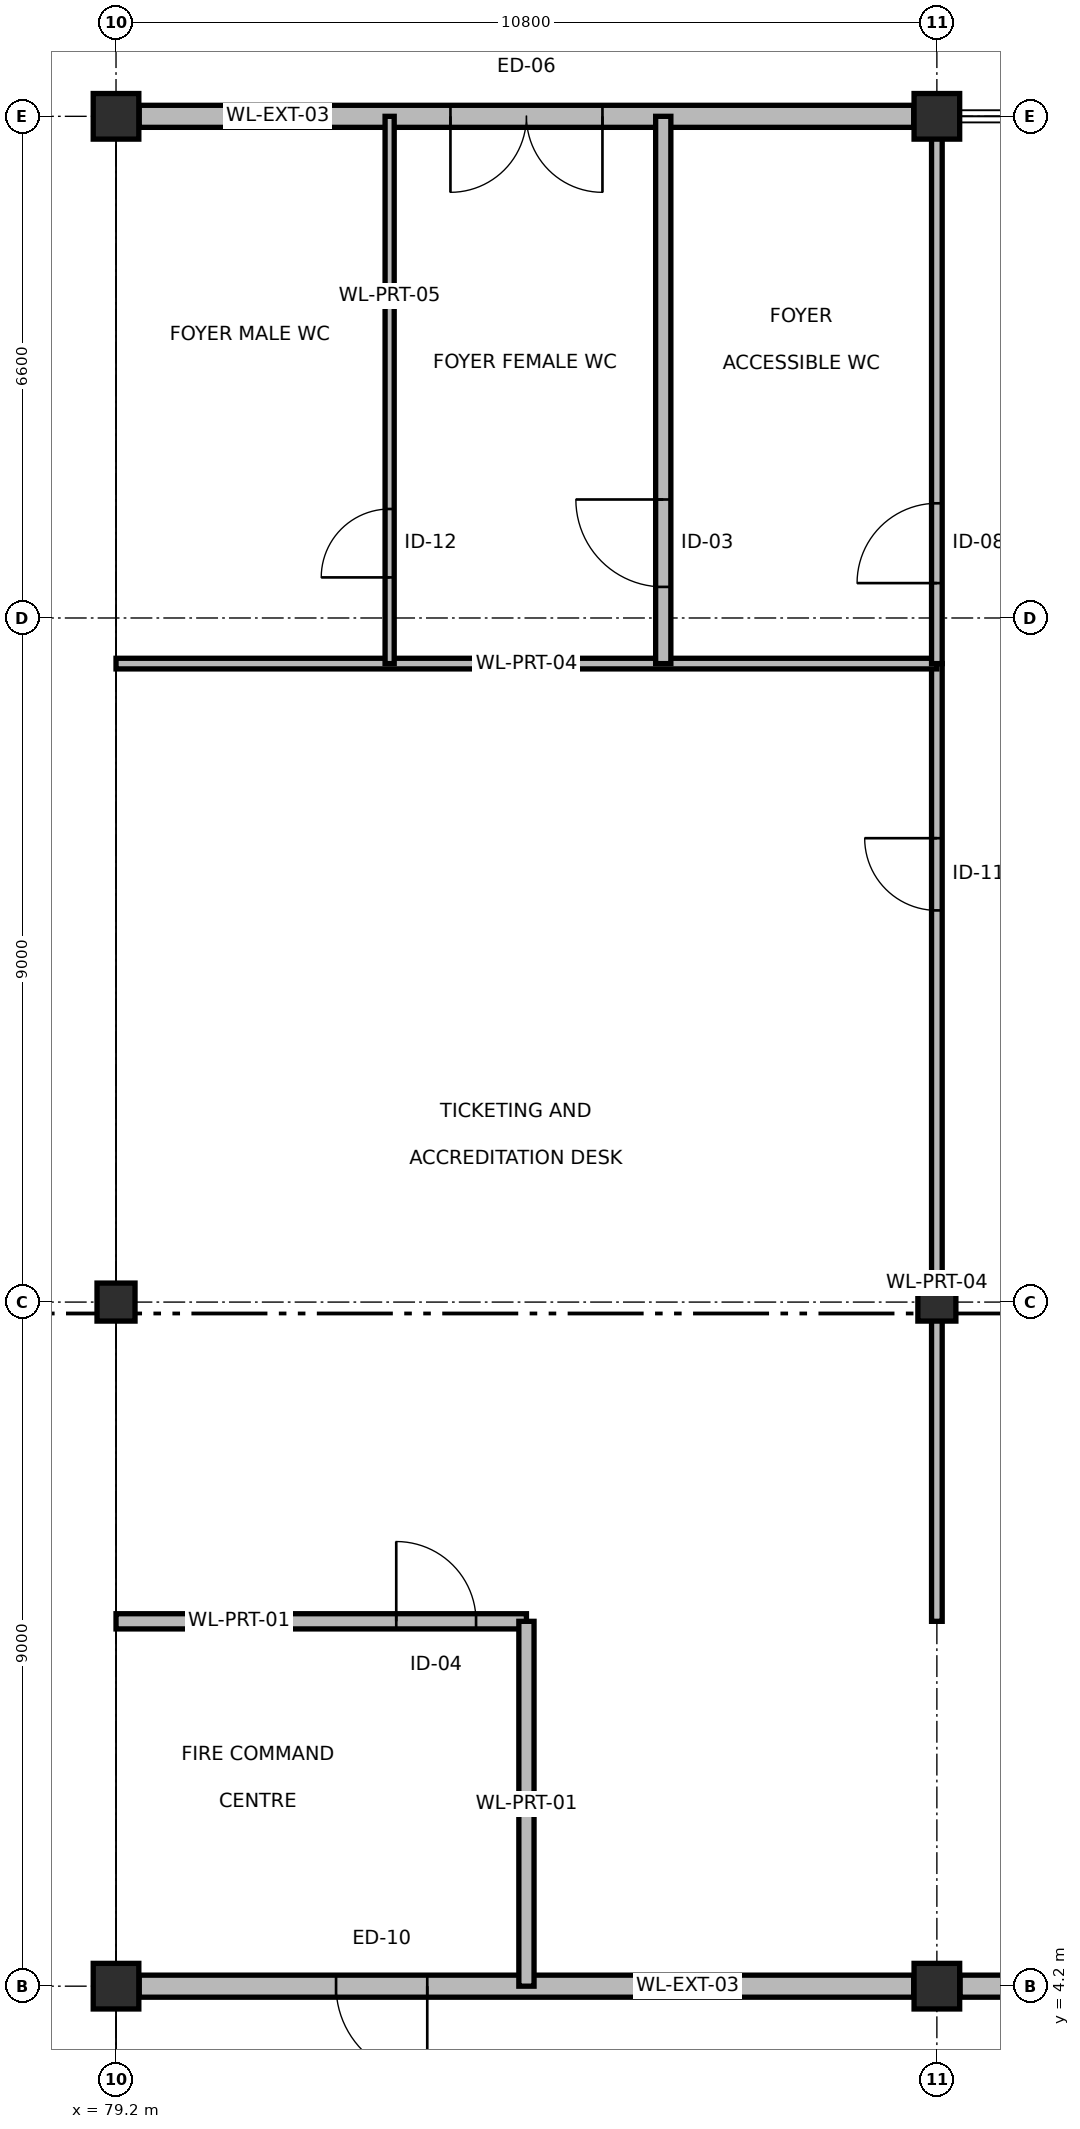
"""IFC4 building model, lengths in metres.
Left out: names, types, materials, properties, quantities, classifications, styles, units other than length and angle.
Written with IfcOpenShell. Run it as: python <this file> out.ifc"""

import sys

from ifc_helpers import new_model, si_unit, direction, frame, frame_2d, origin, origin_2d, place, context, subcontext, project, spatial, rectangle, circle, extrude, element, fill, save


model = new_model("IFC4")
c1 = context("Model", 3, precision=1e-05, world=origin(), true_north=direction((0.0, 1.0)))
c2 = subcontext(c1, "Body", "Model", "MODEL_VIEW")
j1 = project(units=[si_unit("LENGTHUNIT", "METRE"), si_unit("PLANEANGLEUNIT", "RADIAN")], contexts=[c1])
p1 = place(None, origin())
s1 = spatial("IfcSite", under=j1, at=p1, CompositionType="ELEMENT")
p2 = place(p1, origin())
s2 = spatial("IfcBuilding", under=s1, at=p2, CompositionType="ELEMENT")
p3 = place(p2, origin())
s3 = spatial("IfcBuildingStorey", under=s2, at=p3, CompositionType="ELEMENT", Elevation=0.0)
p4 = place(p3, frame((79.2, 4.2, 0.0), z_axis=(0.0, 0.0, 1.0), x_axis=(1.0, 0.0, 0.0)))
e1 = element("IfcColumn", 1, at=p4, inside=s3, PredefinedType="COLUMN", context=c2, shape_type="SweptSolid", body=[
    extrude(circle(Radius=0.3, at=origin_2d()), origin(), (0.0, 0.0, 1.0), 4.8),
])
p5 = place(p3, frame((79.2, 13.2, 0.0), z_axis=(0.0, 0.0, 1.0), x_axis=(1.0, 0.0, 0.0)))
e2 = element("IfcColumn", 2, at=p5, inside=s3, PredefinedType="COLUMN", context=c2, shape_type="SweptSolid", body=[
    extrude(rectangle(XDim=0.5, YDim=0.5, at=origin_2d()), origin(), (0.0, 0.0, 1.0), 4.8),
])
for number, where, z_axis, x_axis in (
    (3, (79.2, 28.8, 0.0), (0.0, 0.0, 1.0), (1.0, 0.0, 0.0)),
    (4, (90.0, 4.2, 0.0), (0.0, 0.0, 1.0), (1.0, 0.0, 0.0)),
):
    element("IfcColumn", number, at=place(p3, frame(where, z_axis=z_axis, x_axis=x_axis)), inside=s3, PredefinedType="COLUMN", context=c2, shape_type="SweptSolid", body=[
        extrude(circle(Radius=0.3, at=origin_2d()), origin(), (0.0, 0.0, 1.0), 4.8),
    ])
p6 = place(p3, frame((90.0, 13.2, 0.0), z_axis=(0.0, 0.0, 1.0), x_axis=(1.0, 0.0, 0.0)))
e5 = element("IfcColumn", 5, at=p6, inside=s3, PredefinedType="COLUMN", context=c2, shape_type="SweptSolid", body=[
    extrude(rectangle(XDim=0.5, YDim=0.5, at=origin_2d()), origin(), (0.0, 0.0, 1.0), 4.8),
])
p7 = place(p3, frame((90.0, 28.8, 0.0), z_axis=(0.0, 0.0, 1.0), x_axis=(1.0, 0.0, 0.0)))
e6 = element("IfcColumn", 6, at=p7, inside=s3, PredefinedType="COLUMN", context=c2, shape_type="SweptSolid", body=[
    extrude(circle(Radius=0.3, at=origin_2d()), origin(), (0.0, 0.0, 1.0), 4.8),
])
p8 = place(p3, frame((89.695, 4.2, 0.0), z_axis=(0.0, 0.0, 1.0), x_axis=(-1.0, 0.0, 0.0)))
e7 = element("IfcWall", 7, at=p8, inside=s3, PredefinedType="SOLIDWALL", context=c2, shape_type="SweptSolid", body=[
    extrude(rectangle(XDim=10.19, YDim=0.29, at=frame_2d((5.095, 0.0))), origin(), (0.0, 0.0, 1.0), 3.685),
])
p9 = place(p8, frame((6.4, 0.0, 0.0)))
e8 = element("IfcOpeningElement", 8, at=p9, cuts=e7, PredefinedType="OPENING", context=c2, shape_type="SweptSolid", body=[
    extrude(rectangle(XDim=1.2, YDim=2.2, at=frame_2d((0.6, 1.1))), frame((0.0, 0.155, 0.0), z_axis=(0.0, -1.0, 0.0), x_axis=(1.0, 0.0, 0.0)), (0.0, 0.0, 1.0), 0.31),
])
p10 = place(p3, frame((79.505, 28.8, 0.0), z_axis=(0.0, 0.0, 1.0), x_axis=(1.0, 0.0, 0.0)))
e9 = element("IfcWall", 9, at=p10, inside=s3, PredefinedType="SOLIDWALL", context=c2, shape_type="SweptSolid", body=[
    extrude(rectangle(XDim=10.19, YDim=0.29, at=frame_2d((5.095, 0.0))), origin(), (0.0, 0.0, 1.0), 3.685),
])
p11 = place(p10, frame((4.095, 0.0, 0.0)))
e10 = element("IfcOpeningElement", 10, at=p11, cuts=e9, PredefinedType="OPENING", context=c2, shape_type="SweptSolid", body=[
    extrude(rectangle(XDim=2.0, YDim=2.4, at=frame_2d((1.0, 1.2))), frame((0.0, 0.155, 0.0), z_axis=(0.0, -1.0, 0.0), x_axis=(1.0, 0.0, 0.0)), (0.0, 0.0, 1.0), 0.31),
])
p12 = place(p3, frame((100.495, 4.2, 0.0), z_axis=(0.0, 0.0, 1.0), x_axis=(-1.0, 0.0, 0.0)))
e11 = element("IfcWall", 11, at=p12, inside=s3, PredefinedType="SOLIDWALL", context=c2, shape_type="SweptSolid", body=[
    extrude(rectangle(XDim=10.19, YDim=0.29, at=frame_2d((5.095, 0.0))), origin(), (0.0, 0.0, 1.0), 3.685),
])
p13 = place(p12, frame((3.295, 0.0, 0.0)))
e12 = element("IfcOpeningElement", 12, at=p13, cuts=e11, PredefinedType="OPENING", context=c2, shape_type="SweptSolid", body=[
    extrude(rectangle(XDim=3.6, YDim=2.8, at=frame_2d((1.8, 1.4))), frame((0.0, 0.155, 0.0), z_axis=(0.0, -1.0, 0.0), x_axis=(1.0, 0.0, 0.0)), (0.0, 0.0, 1.0), 0.31),
])
p14 = place(p3, frame((79.2, 9.0, 0.0), z_axis=(0.0, 0.0, 1.0), x_axis=(1.0, 0.0, 0.0)))
e13 = element("IfcWall", 13, at=p14, inside=s3, PredefinedType="PARTITIONING", context=c2, shape_type="SweptSolid", body=[
    extrude(rectangle(XDim=5.4, YDim=0.2, at=frame_2d((2.7, 0.0))), origin(), (0.0, 0.0, 1.0), 3.835),
])
p15 = place(p14, frame((3.687, 0.0, 0.0)))
e14 = element("IfcOpeningElement", 14, at=p15, cuts=e13, PredefinedType="OPENING", context=c2, shape_type="SweptSolid", body=[
    extrude(rectangle(XDim=1.05, YDim=2.15, at=frame_2d((0.525, 1.075))), frame((0.0, 0.11, 0.0), z_axis=(0.0, -1.0, 0.0), x_axis=(1.0, 0.0, 0.0)), (0.0, 0.0, 1.0), 0.22),
])
p16 = place(p3, frame((84.6, 4.2, 0.0), z_axis=(0.0, 0.0, 1.0), x_axis=(0.0, 1.0, 0.0)))
e15 = element("IfcWall", 15, at=p16, inside=s3, PredefinedType="PARTITIONING", context=c2, shape_type="SweptSolid", body=[
    extrude(rectangle(XDim=4.8, YDim=0.2, at=frame_2d((2.4, 0.0))), origin(), (0.0, 0.0, 1.0), 3.685),
])
p17 = place(p3, frame((90.0, 9.0, 0.0), z_axis=(0.0, 0.0, 1.0), x_axis=(0.0, 1.0, 0.0)))
e16 = element("IfcWall", 16, at=p17, inside=s3, PredefinedType="PARTITIONING", context=c2, shape_type="SweptSolid", body=[
    extrude(rectangle(XDim=12.6, YDim=0.14, at=frame_2d((6.3, 0.0))), origin(), (0.0, 0.0, 1.0), 3.785),
])
p18 = place(p17, frame((9.353, 0.0, 0.0)))
e17 = element("IfcOpeningElement", 17, at=p18, cuts=e16, PredefinedType="OPENING", context=c2, shape_type="SweptSolid", body=[
    extrude(rectangle(XDim=0.95, YDim=2.1, at=frame_2d((0.475, 1.05))), frame((0.0, 0.08, 0.0), z_axis=(0.0, -1.0, 0.0), x_axis=(1.0, 0.0, 0.0)), (0.0, 0.0, 1.0), 0.16),
])
p19 = place(p3, frame((79.2, 21.6, 0.0), z_axis=(0.0, 0.0, 1.0), x_axis=(1.0, 0.0, 0.0)))
e18 = element("IfcWall", 18, at=p19, inside=s3, PredefinedType="PARTITIONING", context=c2, shape_type="SweptSolid", body=[
    extrude(rectangle(XDim=10.8, YDim=0.14, at=frame_2d((5.4, 0.0))), origin(), (0.0, 0.0, 1.0), 3.785),
])
p20 = place(p3, frame((82.8, 21.6, 0.0), z_axis=(0.0, 0.0, 1.0), x_axis=(0.0, 1.0, 0.0)))
e19 = element("IfcWall", 19, at=p20, inside=s3, PredefinedType="PARTITIONING", context=c2, shape_type="SweptSolid", body=[
    extrude(rectangle(XDim=7.2, YDim=0.12, at=frame_2d((3.6, 0.0))), origin(), (0.0, 0.0, 1.0), 3.685),
])
p21 = place(p20, frame((1.134, 0.0, 0.0)))
e20 = element("IfcOpeningElement", 20, at=p21, cuts=e19, PredefinedType="OPENING", context=c2, shape_type="SweptSolid", body=[
    extrude(rectangle(XDim=0.9, YDim=2.1, at=frame_2d((0.45, 1.05))), frame((0.0, 0.07, 0.0), z_axis=(0.0, -1.0, 0.0), x_axis=(1.0, 0.0, 0.0)), (0.0, 0.0, 1.0), 0.14),
])
p22 = place(p3, frame((86.4, 21.6, 0.0), z_axis=(0.0, 0.0, 1.0), x_axis=(0.0, 1.0, 0.0)))
e21 = element("IfcWall", 21, at=p22, inside=s3, PredefinedType="PARTITIONING", context=c2, shape_type="SweptSolid", body=[
    extrude(rectangle(XDim=7.2, YDim=0.2, at=frame_2d((3.6, 0.0))), origin(), (0.0, 0.0, 1.0), 3.685),
])
p23 = place(p22, frame((1.009, 0.0, 0.0)))
e22 = element("IfcOpeningElement", 22, at=p23, cuts=e21, PredefinedType="OPENING", context=c2, shape_type="SweptSolid", body=[
    extrude(rectangle(XDim=1.15, YDim=2.2, at=frame_2d((0.575, 1.1))), frame((0.0, 0.11, 0.0), z_axis=(0.0, -1.0, 0.0), x_axis=(1.0, 0.0, 0.0)), (0.0, 0.0, 1.0), 0.22),
])
p24 = place(p3, frame((90.0, 21.6, 0.0), z_axis=(0.0, 0.0, 1.0), x_axis=(0.0, 1.0, 0.0)))
e23 = element("IfcWall", 23, at=p24, inside=s3, PredefinedType="PARTITIONING", context=c2, shape_type="SweptSolid", body=[
    extrude(rectangle(XDim=7.2, YDim=0.14, at=frame_2d((3.6, 0.0))), origin(), (0.0, 0.0, 1.0), 3.685),
])
p25 = place(p24, frame((1.059, 0.0, 0.0)))
e24 = element("IfcOpeningElement", 24, at=p25, cuts=e23, PredefinedType="OPENING", context=c2, shape_type="SweptSolid", body=[
    extrude(rectangle(XDim=1.05, YDim=2.2, at=frame_2d((0.525, 1.1))), frame((0.0, 0.08, 0.0), z_axis=(0.0, -1.0, 0.0), x_axis=(1.0, 0.0, 0.0)), (0.0, 0.0, 1.0), 0.16),
])
p26 = place(p9, origin())
e25 = element("IfcDoor", 25, at=p26, inside=s3, OperationType="SINGLE_SWING_LEFT", PredefinedType="DOOR", context=c2, shape_type="SweptSolid", body=[
    extrude(rectangle(XDim=1.2, YDim=2.2, at=frame_2d((0.6, 1.1))), frame((0.0, 0.025, 0.0), z_axis=(0.0, -1.0, 0.0), x_axis=(1.0, 0.0, 0.0)), (0.0, 0.0, 1.0), 0.05),
])
fill(e8, e25)
p27 = place(p11, origin())
e26 = element("IfcDoor", 26, at=p27, inside=s3, OperationType="DOUBLE_DOOR_SINGLE_SWING", PredefinedType="DOOR", context=c2, shape_type="SweptSolid", body=[
    extrude(rectangle(XDim=2.0, YDim=2.4, at=frame_2d((1.0, 1.2))), frame((0.0, 0.025, 0.0), z_axis=(0.0, -1.0, 0.0), x_axis=(1.0, 0.0, 0.0)), (0.0, 0.0, 1.0), 0.05),
])
fill(e10, e26)
p28 = place(p15, origin())
e27 = element("IfcDoor", 27, at=p28, inside=s3, OperationType="SINGLE_SWING_LEFT", PredefinedType="DOOR", context=c2, shape_type="SweptSolid", body=[
    extrude(rectangle(XDim=1.05, YDim=2.15, at=frame_2d((0.525, 1.075))), frame((0.0, 0.025, 0.0), z_axis=(0.0, -1.0, 0.0), x_axis=(1.0, 0.0, 0.0)), (0.0, 0.0, 1.0), 0.05),
])
fill(e14, e27)
p29 = place(p18, origin())
e28 = element("IfcDoor", 28, at=p29, inside=s3, OperationType="SINGLE_SWING_RIGHT", PredefinedType="DOOR", context=c2, shape_type="SweptSolid", body=[
    extrude(rectangle(XDim=0.95, YDim=2.1, at=frame_2d((0.475, 1.05))), frame((0.0, 0.025, 0.0), z_axis=(0.0, -1.0, 0.0), x_axis=(1.0, 0.0, 0.0)), (0.0, 0.0, 1.0), 0.05),
])
fill(e17, e28)
p30 = place(p21, origin())
e29 = element("IfcDoor", 29, at=p30, inside=s3, OperationType="SINGLE_SWING_LEFT", PredefinedType="DOOR", context=c2, shape_type="SweptSolid", body=[
    extrude(rectangle(XDim=0.9, YDim=2.1, at=frame_2d((0.45, 1.05))), frame((0.0, 0.025, 0.0), z_axis=(0.0, -1.0, 0.0), x_axis=(1.0, 0.0, 0.0)), (0.0, 0.0, 1.0), 0.05),
])
fill(e20, e29)
p31 = place(p23, origin())
e30 = element("IfcDoor", 30, at=p31, inside=s3, OperationType="SINGLE_SWING_RIGHT", PredefinedType="DOOR", context=c2, shape_type="SweptSolid", body=[
    extrude(rectangle(XDim=1.15, YDim=2.2, at=frame_2d((0.575, 1.1))), frame((0.0, 0.025, 0.0), z_axis=(0.0, -1.0, 0.0), x_axis=(1.0, 0.0, 0.0)), (0.0, 0.0, 1.0), 0.05),
])
fill(e22, e30)
p32 = place(p25, origin())
e31 = element("IfcDoor", 31, at=p32, inside=s3, OperationType="SINGLE_SWING_LEFT", PredefinedType="DOOR", context=c2, shape_type="SweptSolid", body=[
    extrude(rectangle(XDim=1.05, YDim=2.2, at=frame_2d((0.525, 1.1))), frame((0.0, 0.025, 0.0), z_axis=(0.0, -1.0, 0.0), x_axis=(1.0, 0.0, 0.0)), (0.0, 0.0, 1.0), 0.05),
])
fill(e24, e31)
save(model, sys.argv[1])
